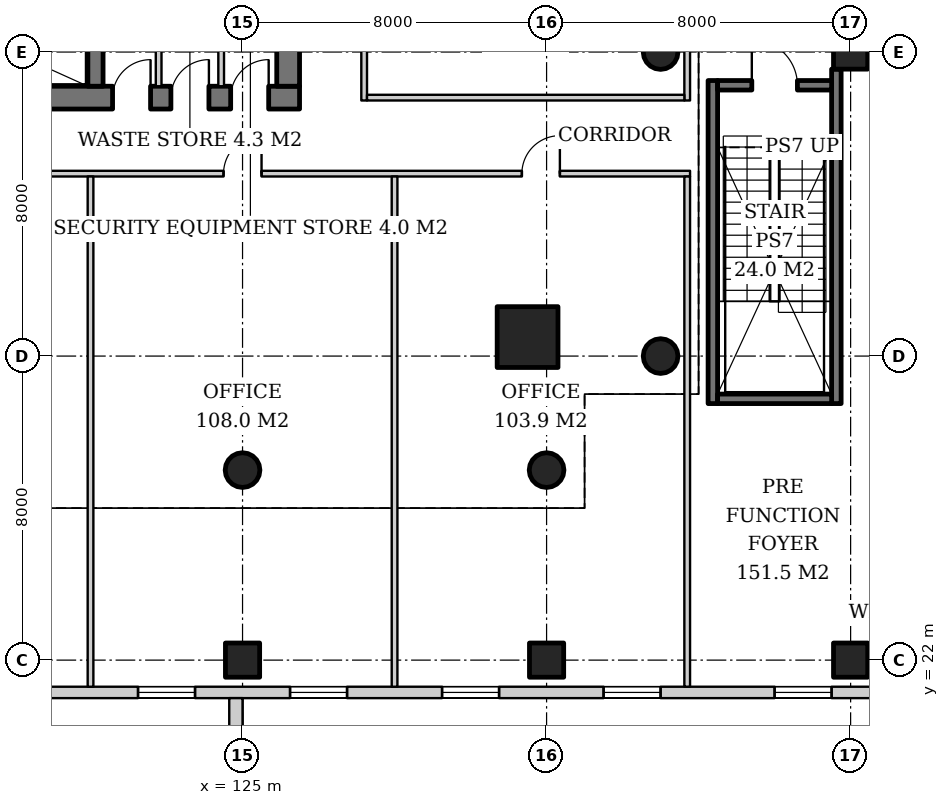
"""IFC4 building model, lengths in metres.
Left out: names, types, materials, properties, quantities, classifications, styles, units other than length and angle.
Written with IfcOpenShell. Run it as: python <this file> out.ifc"""

import sys

from ifc_helpers import new_model, si_unit, direction, frame, frame_2d, origin, origin_2d, place, context, subcontext, project, spatial, rectangle, hollow_circle, extrude, element, fill, save


model = new_model("IFC4")
c1 = context("Model", 3, precision=1e-05, world=origin(), true_north=direction((0.0, 1.0)))
c2 = subcontext(c1, "Body", "Model", "MODEL_VIEW")
j1 = project(units=[si_unit("LENGTHUNIT", "METRE"), si_unit("PLANEANGLEUNIT", "RADIAN")], contexts=[c1])
p1 = place(None, origin())
s1 = spatial("IfcSite", under=j1, at=p1, CompositionType="ELEMENT")
p2 = place(p1, origin())
s2 = spatial("IfcBuilding", under=s1, at=p2, CompositionType="ELEMENT")
p3 = place(p2, frame((0.0, 0.0, 11.0)))
s3 = spatial("IfcBuildingStorey", under=s2, at=p3, CompositionType="ELEMENT", Elevation=11.0)
for number, where, z_axis, x_axis in (
    (1, (125.0, 22.0, 0.0), (0.0, 0.0, 1.0), (1.0, 0.0, 0.0)),
    (2, (133.0, 22.0, 0.0), (0.0, 0.0, 1.0), (1.0, 0.0, 0.0)),
    (3, (141.0, 22.0, 0.0), (0.0, 0.0, 1.0), (1.0, 0.0, 0.0)),
    (4, (141.0, 38.0, 0.0), (0.0, 0.0, 1.0), (1.0, 0.0, 0.0)),
):
    element("IfcColumn", number, at=place(p3, frame(where, z_axis=z_axis, x_axis=x_axis)), inside=s3, PredefinedType="COLUMN", context=c2, shape_type="SweptSolid", body=[
        extrude(rectangle(XDim=0.9, YDim=0.9, at=origin_2d()), origin(), (0.0, 0.0, 1.0), 5.0),
    ])
for number, where, z_axis, x_axis in (
    (5, (136.0, 30.0, 0.0), (0.0, 0.0, 1.0), (1.0, 0.0, 0.0)),
    (6, (136.0, 38.0, 0.0), (0.0, 0.0, 1.0), (1.0, 0.0, 0.0)),
):
    element("IfcColumn", number, at=place(p3, frame(where, z_axis=z_axis, x_axis=x_axis)), inside=s3, PredefinedType="COLUMN", context=c2, shape_type="SweptSolid", body=[
        extrude(hollow_circle(Radius=0.457, WallThickness=0.03, at=origin_2d()), origin(), (0.0, 0.0, 1.0), 5.0),
    ])
p4 = place(p3, frame((132.5, 30.5, 0.0), z_axis=(0.0, 0.0, 1.0), x_axis=(1.0, 0.0, 0.0)))
e7 = element("IfcColumn", 7, at=p4, inside=s3, PredefinedType="COLUMN", context=c2, shape_type="SweptSolid", body=[
    extrude(rectangle(XDim=1.6, YDim=1.6, at=origin_2d()), origin(), (0.0, 0.0, 1.0), 5.0),
])
for number, where, z_axis, x_axis in (
    (8, (133.0, 27.0, 0.0), (0.0, 0.0, 1.0), (1.0, 0.0, 0.0)),
    (9, (125.0, 27.0, 0.0), (0.0, 0.0, 1.0), (1.0, 0.0, 0.0)),
):
    element("IfcColumn", number, at=place(p3, frame(where, z_axis=z_axis, x_axis=x_axis)), inside=s3, PredefinedType="COLUMN", context=c2, shape_type="SweptSolid", body=[
        extrude(hollow_circle(Radius=0.457, WallThickness=0.03, at=origin_2d()), origin(), (0.0, 0.0, 1.0), 5.0),
    ])
p5 = place(p3, frame((107.5, 36.8, 0.0), z_axis=(0.0, 0.0, 1.0), x_axis=(1.0, 0.0, 0.0)))
e10 = element("IfcWall", 10, at=p5, inside=s3, PredefinedType="SHEAR", context=c2, shape_type="SweptSolid", body=[
    extrude(rectangle(XDim=19.0, YDim=0.6, at=frame_2d((9.5, 0.0))), origin(), (0.0, 0.0, 1.0), 5.0),
])
p6 = place(p5, frame((3.9, 0.0, 0.0)))
e11 = element("IfcOpeningElement", 11, at=p6, cuts=e10, PredefinedType="OPENING", context=c2, shape_type="SweptSolid", body=[
    extrude(rectangle(XDim=1.0, YDim=2.1, at=frame_2d((0.5, 1.05))), frame((0.0, 0.31, 0.0), z_axis=(0.0, -1.0, 0.0), x_axis=(1.0, 0.0, 0.0)), (0.0, 0.0, 1.0), 0.62),
])
p7 = place(p5, frame((14.08, 0.0, 0.0)))
e12 = element("IfcOpeningElement", 12, at=p7, cuts=e10, PredefinedType="OPENING", context=c2, shape_type="SweptSolid", body=[
    extrude(rectangle(XDim=1.0, YDim=2.1, at=frame_2d((0.5, 1.05))), frame((0.0, 0.31, 0.0), z_axis=(0.0, -1.0, 0.0), x_axis=(1.0, 0.0, 0.0)), (0.0, 0.0, 1.0), 0.62),
])
p8 = place(p5, frame((15.615, 0.0, 0.0)))
e13 = element("IfcOpeningElement", 13, at=p8, cuts=e10, PredefinedType="OPENING", context=c2, shape_type="SweptSolid", body=[
    extrude(rectangle(XDim=1.0, YDim=2.1, at=frame_2d((0.5, 1.05))), frame((0.0, 0.31, 0.0), z_axis=(0.0, -1.0, 0.0), x_axis=(1.0, 0.0, 0.0)), (0.0, 0.0, 1.0), 0.62),
])
p9 = place(p5, frame((17.188, 0.0, 0.0)))
e14 = element("IfcOpeningElement", 14, at=p9, cuts=e10, PredefinedType="OPENING", context=c2, shape_type="SweptSolid", body=[
    extrude(rectangle(XDim=1.0, YDim=2.1, at=frame_2d((0.5, 1.05))), frame((0.0, 0.31, 0.0), z_axis=(0.0, -1.0, 0.0), x_axis=(1.0, 0.0, 0.0)), (0.0, 0.0, 1.0), 0.62),
])
p10 = place(p3, frame((126.2, 37.1, 0.0), z_axis=(0.0, 0.0, 1.0), x_axis=(0.0, 1.0, 0.0)))
e15 = element("IfcWall", 15, at=p10, inside=s3, PredefinedType="SHEAR", context=c2, shape_type="SweptSolid", body=[
    extrude(rectangle(XDim=17.8, YDim=0.6, at=frame_2d((8.9, 0.0))), origin(), (0.0, 0.0, 1.0), 5.0),
])
p11 = place(p10, frame((8.0, 0.0, 0.0)))
e16 = element("IfcOpeningElement", 16, at=p11, cuts=e15, PredefinedType="OPENING", context=c2, shape_type="SweptSolid", body=[
    extrude(rectangle(XDim=1.8, YDim=2.4, at=frame_2d((0.9, 1.2))), frame((0.0, 0.31, 0.0), z_axis=(0.0, -1.0, 0.0), x_axis=(1.0, 0.0, 0.0)), (0.0, 0.0, 1.0), 0.62),
])
p12 = place(p3, frame((121.13, 37.1, 0.0), z_axis=(0.0, 0.0, 1.0), x_axis=(0.0, 1.0, 0.0)))
e17 = element("IfcWall", 17, at=p12, inside=s3, PredefinedType="SHEAR", context=c2, shape_type="SweptSolid", body=[
    extrude(rectangle(XDim=2.9, YDim=0.4, at=frame_2d((1.45, 0.0))), origin(), (0.0, 0.0, 1.0), 5.0),
])
p13 = place(p3, frame((92.0, 21.15, 0.0), z_axis=(0.0, 0.0, 1.0), x_axis=(1.0, 0.0, 0.0)))
e18 = element("IfcWall", 18, at=p13, inside=s3, PredefinedType="SOLIDWALL", context=c2, shape_type="SweptSolid", body=[
    extrude(rectangle(XDim=50.0, YDim=0.3, at=frame_2d((25.0, 0.0))), origin(), (0.0, 0.0, 1.0), 4.7),
])
p14 = place(p13, frame((1.5, 0.0, 0.9)))
e19 = element("IfcOpeningElement", 19, at=p14, cuts=e18, PredefinedType="OPENING", context=c2, shape_type="SweptSolid", body=[
    extrude(rectangle(XDim=1.5, YDim=3.2, at=frame_2d((0.75, 1.6))), frame((0.0, 0.16, 0.0), z_axis=(0.0, -1.0, 0.0), x_axis=(1.0, 0.0, 0.0)), (0.0, 0.0, 1.0), 0.32),
])
p15 = place(p13, frame((6.0, 0.0, 0.9)))
e20 = element("IfcOpeningElement", 20, at=p15, cuts=e18, PredefinedType="OPENING", context=c2, shape_type="SweptSolid", body=[
    extrude(rectangle(XDim=1.5, YDim=3.2, at=frame_2d((0.75, 1.6))), frame((0.0, 0.16, 0.0), z_axis=(0.0, -1.0, 0.0), x_axis=(1.0, 0.0, 0.0)), (0.0, 0.0, 1.0), 0.32),
])
p16 = place(p13, frame((10.25, 0.0, 0.9)))
e21 = element("IfcOpeningElement", 21, at=p16, cuts=e18, PredefinedType="OPENING", context=c2, shape_type="SweptSolid", body=[
    extrude(rectangle(XDim=1.5, YDim=3.2, at=frame_2d((0.75, 1.6))), frame((0.0, 0.16, 0.0), z_axis=(0.0, -1.0, 0.0), x_axis=(1.0, 0.0, 0.0)), (0.0, 0.0, 1.0), 0.32),
])
p17 = place(p13, frame((14.25, 0.0, 0.9)))
e22 = element("IfcOpeningElement", 22, at=p17, cuts=e18, PredefinedType="OPENING", context=c2, shape_type="SweptSolid", body=[
    extrude(rectangle(XDim=1.5, YDim=3.2, at=frame_2d((0.75, 1.6))), frame((0.0, 0.16, 0.0), z_axis=(0.0, -1.0, 0.0), x_axis=(1.0, 0.0, 0.0)), (0.0, 0.0, 1.0), 0.32),
])
p18 = place(p13, frame((18.25, 0.0, 0.9)))
e23 = element("IfcOpeningElement", 23, at=p18, cuts=e18, PredefinedType="OPENING", context=c2, shape_type="SweptSolid", body=[
    extrude(rectangle(XDim=1.5, YDim=3.2, at=frame_2d((0.75, 1.6))), frame((0.0, 0.16, 0.0), z_axis=(0.0, -1.0, 0.0), x_axis=(1.0, 0.0, 0.0)), (0.0, 0.0, 1.0), 0.32),
])
p19 = place(p13, frame((22.25, 0.0, 0.9)))
e24 = element("IfcOpeningElement", 24, at=p19, cuts=e18, PredefinedType="OPENING", context=c2, shape_type="SweptSolid", body=[
    extrude(rectangle(XDim=1.5, YDim=3.2, at=frame_2d((0.75, 1.6))), frame((0.0, 0.16, 0.0), z_axis=(0.0, -1.0, 0.0), x_axis=(1.0, 0.0, 0.0)), (0.0, 0.0, 1.0), 0.32),
])
p20 = place(p13, frame((26.1, 0.0, 0.0)))
e25 = element("IfcOpeningElement", 25, at=p20, cuts=e18, PredefinedType="OPENING", context=c2, shape_type="SweptSolid", body=[
    extrude(rectangle(XDim=1.8, YDim=2.4, at=frame_2d((0.9, 1.2))), frame((0.0, 0.16, 0.0), z_axis=(0.0, -1.0, 0.0), x_axis=(1.0, 0.0, 0.0)), (0.0, 0.0, 1.0), 0.32),
])
p21 = place(p13, frame((30.25, 0.0, 0.9)))
e26 = element("IfcOpeningElement", 26, at=p21, cuts=e18, PredefinedType="OPENING", context=c2, shape_type="SweptSolid", body=[
    extrude(rectangle(XDim=1.5, YDim=3.2, at=frame_2d((0.75, 1.6))), frame((0.0, 0.16, 0.0), z_axis=(0.0, -1.0, 0.0), x_axis=(1.0, 0.0, 0.0)), (0.0, 0.0, 1.0), 0.32),
])
p22 = place(p13, frame((34.25, 0.0, 0.9)))
e27 = element("IfcOpeningElement", 27, at=p22, cuts=e18, PredefinedType="OPENING", context=c2, shape_type="SweptSolid", body=[
    extrude(rectangle(XDim=1.5, YDim=3.2, at=frame_2d((0.75, 1.6))), frame((0.0, 0.16, 0.0), z_axis=(0.0, -1.0, 0.0), x_axis=(1.0, 0.0, 0.0)), (0.0, 0.0, 1.0), 0.32),
])
p23 = place(p13, frame((38.25, 0.0, 0.9)))
e28 = element("IfcOpeningElement", 28, at=p23, cuts=e18, PredefinedType="OPENING", context=c2, shape_type="SweptSolid", body=[
    extrude(rectangle(XDim=1.5, YDim=3.2, at=frame_2d((0.75, 1.6))), frame((0.0, 0.16, 0.0), z_axis=(0.0, -1.0, 0.0), x_axis=(1.0, 0.0, 0.0)), (0.0, 0.0, 1.0), 0.32),
])
p24 = place(p13, frame((42.5, 0.0, 0.9)))
e29 = element("IfcOpeningElement", 29, at=p24, cuts=e18, PredefinedType="OPENING", context=c2, shape_type="SweptSolid", body=[
    extrude(rectangle(XDim=1.5, YDim=3.2, at=frame_2d((0.75, 1.6))), frame((0.0, 0.16, 0.0), z_axis=(0.0, -1.0, 0.0), x_axis=(1.0, 0.0, 0.0)), (0.0, 0.0, 1.0), 0.32),
])
p25 = place(p13, frame((47.0, 0.0, 0.9)))
e30 = element("IfcOpeningElement", 30, at=p25, cuts=e18, PredefinedType="OPENING", context=c2, shape_type="SweptSolid", body=[
    extrude(rectangle(XDim=1.5, YDim=3.2, at=frame_2d((0.75, 1.6))), frame((0.0, 0.16, 0.0), z_axis=(0.0, -1.0, 0.0), x_axis=(1.0, 0.0, 0.0)), (0.0, 0.0, 1.0), 0.32),
])
p26 = place(p3, frame((124.825, 13.0, 0.0), z_axis=(0.0, 0.0, 1.0), x_axis=(0.0, 1.0, 0.0)))
e31 = element("IfcWall", 31, at=p26, inside=s3, PredefinedType="PARAPET", context=c2, shape_type="SweptSolid", body=[
    extrude(rectangle(XDim=8.0, YDim=0.35, at=frame_2d((4.0, 0.0))), origin(), (0.0, 0.0, 1.0), 1.1),
])
for number, where, z_axis, x_axis in (
    (32, (122.792, 37.1, 0.0), (0.0, 0.0, 1.0), (0.0, 1.0, 0.0)),
    (33, (124.438, 37.1, 0.0), (0.0, 0.0, 1.0), (0.0, 1.0, 0.0)),
):
    element("IfcWall", number, at=place(p3, frame(where, z_axis=z_axis, x_axis=x_axis)), inside=s3, PredefinedType="SOLIDWALL", context=c2, shape_type="SweptSolid", body=[
        extrude(rectangle(XDim=2.9, YDim=0.15, at=frame_2d((1.45, 0.0))), origin(), (0.0, 0.0, 1.0), 4.7),
    ])
p27 = place(p3, frame((137.375, 28.75, 0.0), z_axis=(0.0, 0.0, 1.0), x_axis=(0.0, 1.0, 0.0)))
e34 = element("IfcWall", 34, at=p27, inside=s3, PredefinedType="SOLIDWALL", context=c2, shape_type="SweptSolid", body=[
    extrude(rectangle(XDim=8.5, YDim=0.25, at=frame_2d((4.25, 0.0))), origin(), (0.0, 0.0, 1.0), 4.7),
])
p28 = place(p3, frame((140.625, 28.75, 0.0), z_axis=(0.0, 0.0, 1.0), x_axis=(0.0, 1.0, 0.0)))
e35 = element("IfcWall", 35, at=p28, inside=s3, PredefinedType="SOLIDWALL", context=c2, shape_type="SweptSolid", body=[
    extrude(rectangle(XDim=8.8, YDim=0.25, at=frame_2d((4.4, 0.0))), origin(), (0.0, 0.0, 1.0), 4.7),
])
p29 = place(p3, frame((137.5, 28.875, 0.0), z_axis=(0.0, 0.0, 1.0), x_axis=(1.0, 0.0, 0.0)))
e36 = element("IfcWall", 36, at=p29, inside=s3, PredefinedType="SOLIDWALL", context=c2, shape_type="SweptSolid", body=[
    extrude(rectangle(XDim=3.0, YDim=0.25, at=frame_2d((1.5, 0.0))), origin(), (0.0, 0.0, 1.0), 4.7),
])
p30 = place(p3, frame((137.5, 37.125, 0.0), z_axis=(0.0, 0.0, 1.0), x_axis=(1.0, 0.0, 0.0)))
e37 = element("IfcWall", 37, at=p30, inside=s3, PredefinedType="SOLIDWALL", context=c2, shape_type="SweptSolid", body=[
    extrude(rectangle(XDim=3.0, YDim=0.25, at=frame_2d((1.5, 0.0))), origin(), (0.0, 0.0, 1.0), 4.7),
])
p31 = place(p30, frame((0.9, 0.0, 0.0)))
e38 = element("IfcOpeningElement", 38, at=p31, cuts=e37, PredefinedType="OPENING", context=c2, shape_type="SweptSolid", body=[
    extrude(rectangle(XDim=1.2, YDim=2.1, at=frame_2d((0.6, 1.05))), frame((0.0, 0.135, 0.0), z_axis=(0.0, -1.0, 0.0), x_axis=(1.0, 0.0, 0.0)), (0.0, 0.0, 1.0), 0.27),
])
p32 = place(p3, frame((97.225, 34.8, 0.0), z_axis=(0.0, 0.0, 1.0), x_axis=(1.0, 0.0, 0.0)))
e39 = element("IfcWall", 39, at=p32, inside=s3, PredefinedType="PARTITIONING", context=c2, shape_type="SweptSolid", body=[
    extrude(rectangle(XDim=39.55, YDim=0.15, at=frame_2d((19.775, 0.0))), origin(), (0.0, 0.0, 1.0), 3.9),
])
p33 = place(p32, frame((3.025, 0.0, 0.0)))
e40 = element("IfcOpeningElement", 40, at=p33, cuts=e39, PredefinedType="OPENING", context=c2, shape_type="SweptSolid", body=[
    extrude(rectangle(XDim=1.8, YDim=2.4, at=frame_2d((0.9, 1.2))), frame((0.0, 0.085, 0.0), z_axis=(0.0, -1.0, 0.0), x_axis=(1.0, 0.0, 0.0)), (0.0, 0.0, 1.0), 0.17),
])
p34 = place(p32, frame((11.275, 0.0, 0.0)))
e41 = element("IfcOpeningElement", 41, at=p34, cuts=e39, PredefinedType="OPENING", context=c2, shape_type="SweptSolid", body=[
    extrude(rectangle(XDim=1.0, YDim=2.1, at=frame_2d((0.5, 1.05))), frame((0.0, 0.085, 0.0), z_axis=(0.0, -1.0, 0.0), x_axis=(1.0, 0.0, 0.0)), (0.0, 0.0, 1.0), 0.17),
])
p35 = place(p32, frame((19.275, 0.0, 0.0)))
e42 = element("IfcOpeningElement", 42, at=p35, cuts=e39, PredefinedType="OPENING", context=c2, shape_type="SweptSolid", body=[
    extrude(rectangle(XDim=1.0, YDim=2.1, at=frame_2d((0.5, 1.05))), frame((0.0, 0.085, 0.0), z_axis=(0.0, -1.0, 0.0), x_axis=(1.0, 0.0, 0.0)), (0.0, 0.0, 1.0), 0.17),
])
p36 = place(p32, frame((27.275, 0.0, 0.0)))
e43 = element("IfcOpeningElement", 43, at=p36, cuts=e39, PredefinedType="OPENING", context=c2, shape_type="SweptSolid", body=[
    extrude(rectangle(XDim=1.0, YDim=2.1, at=frame_2d((0.5, 1.05))), frame((0.0, 0.085, 0.0), z_axis=(0.0, -1.0, 0.0), x_axis=(1.0, 0.0, 0.0)), (0.0, 0.0, 1.0), 0.17),
])
p37 = place(p32, frame((35.125, 0.0, 0.0)))
e44 = element("IfcOpeningElement", 44, at=p37, cuts=e39, PredefinedType="OPENING", context=c2, shape_type="SweptSolid", body=[
    extrude(rectangle(XDim=1.0, YDim=2.1, at=frame_2d((0.5, 1.05))), frame((0.0, 0.085, 0.0), z_axis=(0.0, -1.0, 0.0), x_axis=(1.0, 0.0, 0.0)), (0.0, 0.0, 1.0), 0.17),
])
p38 = place(p3, frame((136.7, 21.3, 0.0), z_axis=(0.0, 0.0, 1.0), x_axis=(0.0, 1.0, 0.0)))
e45 = element("IfcWall", 45, at=p38, inside=s3, PredefinedType="PARTITIONING", context=c2, shape_type="SweptSolid", body=[
    extrude(rectangle(XDim=13.425, YDim=0.15, at=frame_2d((6.712, 0.0))), origin(), (0.0, 0.0, 1.0), 4.7),
])
for number, where, z_axis, x_axis in (
    (46, (121.0, 21.3, 0.0), (0.0, 0.0, 1.0), (0.0, 1.0, 0.0)),
    (47, (129.0, 21.3, 0.0), (0.0, 0.0, 1.0), (0.0, 1.0, 0.0)),
):
    element("IfcWall", number, at=place(p3, frame(where, z_axis=z_axis, x_axis=x_axis)), inside=s3, PredefinedType="PARTITIONING", context=c2, shape_type="SweptSolid", body=[
        extrude(rectangle(XDim=13.425, YDim=0.15, at=frame_2d((6.712, 0.0))), origin(), (0.0, 0.0, 1.0), 4.15),
    ])
p39 = place(p3, frame((128.2, 36.725, 0.0), z_axis=(0.0, 0.0, 1.0), x_axis=(0.0, 1.0, 0.0)))
e48 = element("IfcWall", 48, at=p39, inside=s3, PredefinedType="PARTITIONING", context=c2, shape_type="SweptSolid", body=[
    extrude(rectangle(XDim=20.475, YDim=0.15, at=frame_2d((10.237, 0.0))), origin(), (0.0, 0.0, 1.0), 3.9),
])
p40 = place(p39, frame((1.425, 0.0, 0.0)))
e49 = element("IfcOpeningElement", 49, at=p40, cuts=e48, PredefinedType="OPENING", context=c2, shape_type="SweptSolid", body=[
    extrude(rectangle(XDim=1.0, YDim=2.1, at=frame_2d((0.5, 1.05))), frame((0.0, 0.085, 0.0), z_axis=(0.0, -1.0, 0.0), x_axis=(1.0, 0.0, 0.0)), (0.0, 0.0, 1.0), 0.17),
])
p41 = place(p39, frame((5.275, 0.0, 0.0)))
e50 = element("IfcOpeningElement", 50, at=p41, cuts=e48, PredefinedType="OPENING", context=c2, shape_type="SweptSolid", body=[
    extrude(rectangle(XDim=1.0, YDim=2.1, at=frame_2d((0.5, 1.05))), frame((0.0, 0.085, 0.0), z_axis=(0.0, -1.0, 0.0), x_axis=(1.0, 0.0, 0.0)), (0.0, 0.0, 1.0), 0.17),
])
p42 = place(p39, frame((9.775, 0.0, 0.0)))
e51 = element("IfcOpeningElement", 51, at=p42, cuts=e48, PredefinedType="OPENING", context=c2, shape_type="SweptSolid", body=[
    extrude(rectangle(XDim=1.0, YDim=2.1, at=frame_2d((0.5, 1.05))), frame((0.0, 0.085, 0.0), z_axis=(0.0, -1.0, 0.0), x_axis=(1.0, 0.0, 0.0)), (0.0, 0.0, 1.0), 0.17),
])
p43 = place(p39, frame((14.275, 0.0, 0.0)))
e52 = element("IfcOpeningElement", 52, at=p43, cuts=e48, PredefinedType="OPENING", context=c2, shape_type="SweptSolid", body=[
    extrude(rectangle(XDim=1.0, YDim=2.1, at=frame_2d((0.5, 1.05))), frame((0.0, 0.085, 0.0), z_axis=(0.0, -1.0, 0.0), x_axis=(1.0, 0.0, 0.0)), (0.0, 0.0, 1.0), 0.17),
])
p44 = place(p39, frame((18.125, 0.0, 0.0)))
e53 = element("IfcOpeningElement", 53, at=p44, cuts=e48, PredefinedType="OPENING", context=c2, shape_type="SweptSolid", body=[
    extrude(rectangle(XDim=1.0, YDim=2.1, at=frame_2d((0.5, 1.05))), frame((0.0, 0.085, 0.0), z_axis=(0.0, -1.0, 0.0), x_axis=(1.0, 0.0, 0.0)), (0.0, 0.0, 1.0), 0.17),
])
p45 = place(p3, frame((136.7, 36.725, 0.0), z_axis=(0.0, 0.0, 1.0), x_axis=(0.0, 1.0, 0.0)))
e54 = element("IfcWall", 54, at=p45, inside=s3, PredefinedType="PARTITIONING", context=c2, shape_type="SweptSolid", body=[
    extrude(rectangle(XDim=20.475, YDim=0.15, at=frame_2d((10.237, 0.0))), origin(), (0.0, 0.0, 1.0), 4.7),
])
p46 = place(p3, frame((128.275, 36.8, 0.0), z_axis=(0.0, 0.0, 1.0), x_axis=(1.0, 0.0, 0.0)))
e55 = element("IfcWall", 55, at=p46, inside=s3, PredefinedType="PARTITIONING", context=c2, shape_type="SweptSolid", body=[
    extrude(rectangle(XDim=8.35, YDim=0.15, at=frame_2d((4.175, 0.0))), origin(), (0.0, 0.0, 1.0), 3.9),
])
p47 = place(p21, origin())
e56 = element("IfcWindow", 56, at=p47, inside=s3, PartitioningType="SINGLE_PANEL", PredefinedType="WINDOW", context=c2, shape_type="SweptSolid", body=[
    extrude(rectangle(XDim=1.5, YDim=3.2, at=frame_2d((0.75, 1.6))), frame((0.0, 0.03, 0.0), z_axis=(0.0, -1.0, 0.0), x_axis=(1.0, 0.0, 0.0)), (0.0, 0.0, 1.0), 0.06),
])
fill(e26, e56)
p48 = place(p22, origin())
e57 = element("IfcWindow", 57, at=p48, inside=s3, PartitioningType="SINGLE_PANEL", PredefinedType="WINDOW", context=c2, shape_type="SweptSolid", body=[
    extrude(rectangle(XDim=1.5, YDim=3.2, at=frame_2d((0.75, 1.6))), frame((0.0, 0.03, 0.0), z_axis=(0.0, -1.0, 0.0), x_axis=(1.0, 0.0, 0.0)), (0.0, 0.0, 1.0), 0.06),
])
fill(e27, e57)
p49 = place(p23, origin())
e58 = element("IfcWindow", 58, at=p49, inside=s3, PartitioningType="SINGLE_PANEL", PredefinedType="WINDOW", context=c2, shape_type="SweptSolid", body=[
    extrude(rectangle(XDim=1.5, YDim=3.2, at=frame_2d((0.75, 1.6))), frame((0.0, 0.03, 0.0), z_axis=(0.0, -1.0, 0.0), x_axis=(1.0, 0.0, 0.0)), (0.0, 0.0, 1.0), 0.06),
])
fill(e28, e58)
p50 = place(p24, origin())
e59 = element("IfcWindow", 59, at=p50, inside=s3, PartitioningType="SINGLE_PANEL", PredefinedType="WINDOW", context=c2, shape_type="SweptSolid", body=[
    extrude(rectangle(XDim=1.5, YDim=3.2, at=frame_2d((0.75, 1.6))), frame((0.0, 0.03, 0.0), z_axis=(0.0, -1.0, 0.0), x_axis=(1.0, 0.0, 0.0)), (0.0, 0.0, 1.0), 0.06),
])
fill(e29, e59)
p51 = place(p25, origin())
e60 = element("IfcWindow", 60, at=p51, inside=s3, PartitioningType="SINGLE_PANEL", PredefinedType="WINDOW", context=c2, shape_type="SweptSolid", body=[
    extrude(rectangle(XDim=1.5, YDim=3.2, at=frame_2d((0.75, 1.6))), frame((0.0, 0.03, 0.0), z_axis=(0.0, -1.0, 0.0), x_axis=(1.0, 0.0, 0.0)), (0.0, 0.0, 1.0), 0.06),
])
fill(e30, e60)
p52 = place(p7, origin())
e61 = element("IfcDoor", 61, at=p52, inside=s3, OperationType="SINGLE_SWING_RIGHT", PredefinedType="DOOR", context=c2, shape_type="SweptSolid", body=[
    extrude(rectangle(XDim=1.0, YDim=2.1, at=frame_2d((0.5, 1.05))), frame((0.0, 0.29, 0.0), z_axis=(0.0, -1.0, 0.0), x_axis=(1.0, 0.0, 0.0)), (0.0, 0.0, 1.0), 0.05),
])
fill(e12, e61)
p53 = place(p8, origin())
e62 = element("IfcDoor", 62, at=p53, inside=s3, OperationType="SINGLE_SWING_RIGHT", PredefinedType="DOOR", context=c2, shape_type="SweptSolid", body=[
    extrude(rectangle(XDim=1.0, YDim=2.1, at=frame_2d((0.5, 1.05))), frame((0.0, 0.29, 0.0), z_axis=(0.0, -1.0, 0.0), x_axis=(1.0, 0.0, 0.0)), (0.0, 0.0, 1.0), 0.05),
])
fill(e13, e62)
p54 = place(p9, origin())
e63 = element("IfcDoor", 63, at=p54, inside=s3, OperationType="SINGLE_SWING_RIGHT", PredefinedType="DOOR", context=c2, shape_type="SweptSolid", body=[
    extrude(rectangle(XDim=1.0, YDim=2.1, at=frame_2d((0.5, 1.05))), frame((0.0, 0.29, 0.0), z_axis=(0.0, -1.0, 0.0), x_axis=(1.0, 0.0, 0.0)), (0.0, 0.0, 1.0), 0.05),
])
fill(e14, e63)
p55 = place(p31, origin())
e64 = element("IfcDoor", 64, at=p55, inside=s3, OperationType="SINGLE_SWING_LEFT", PredefinedType="DOOR", context=c2, shape_type="SweptSolid", body=[
    extrude(rectangle(XDim=1.2, YDim=2.1, at=frame_2d((0.6, 1.05))), frame((0.0, 0.025, 0.0), z_axis=(0.0, -1.0, 0.0), x_axis=(1.0, 0.0, 0.0)), (0.0, 0.0, 1.0), 0.05),
])
fill(e38, e64)
p56 = place(p36, origin())
e65 = element("IfcDoor", 65, at=p56, inside=s3, OperationType="SINGLE_SWING_RIGHT", PredefinedType="DOOR", context=c2, shape_type="SweptSolid", body=[
    extrude(rectangle(XDim=1.0, YDim=2.1, at=frame_2d((0.5, 1.05))), frame((0.0, 0.025, 0.0), z_axis=(0.0, -1.0, 0.0), x_axis=(1.0, 0.0, 0.0)), (0.0, 0.0, 1.0), 0.05),
])
fill(e43, e65)
p57 = place(p37, origin())
e66 = element("IfcDoor", 66, at=p57, inside=s3, OperationType="SINGLE_SWING_RIGHT", PredefinedType="DOOR", context=c2, shape_type="SweptSolid", body=[
    extrude(rectangle(XDim=1.0, YDim=2.1, at=frame_2d((0.5, 1.05))), frame((0.0, 0.025, 0.0), z_axis=(0.0, -1.0, 0.0), x_axis=(1.0, 0.0, 0.0)), (0.0, 0.0, 1.0), 0.05),
])
fill(e44, e66)
save(model, sys.argv[1])
